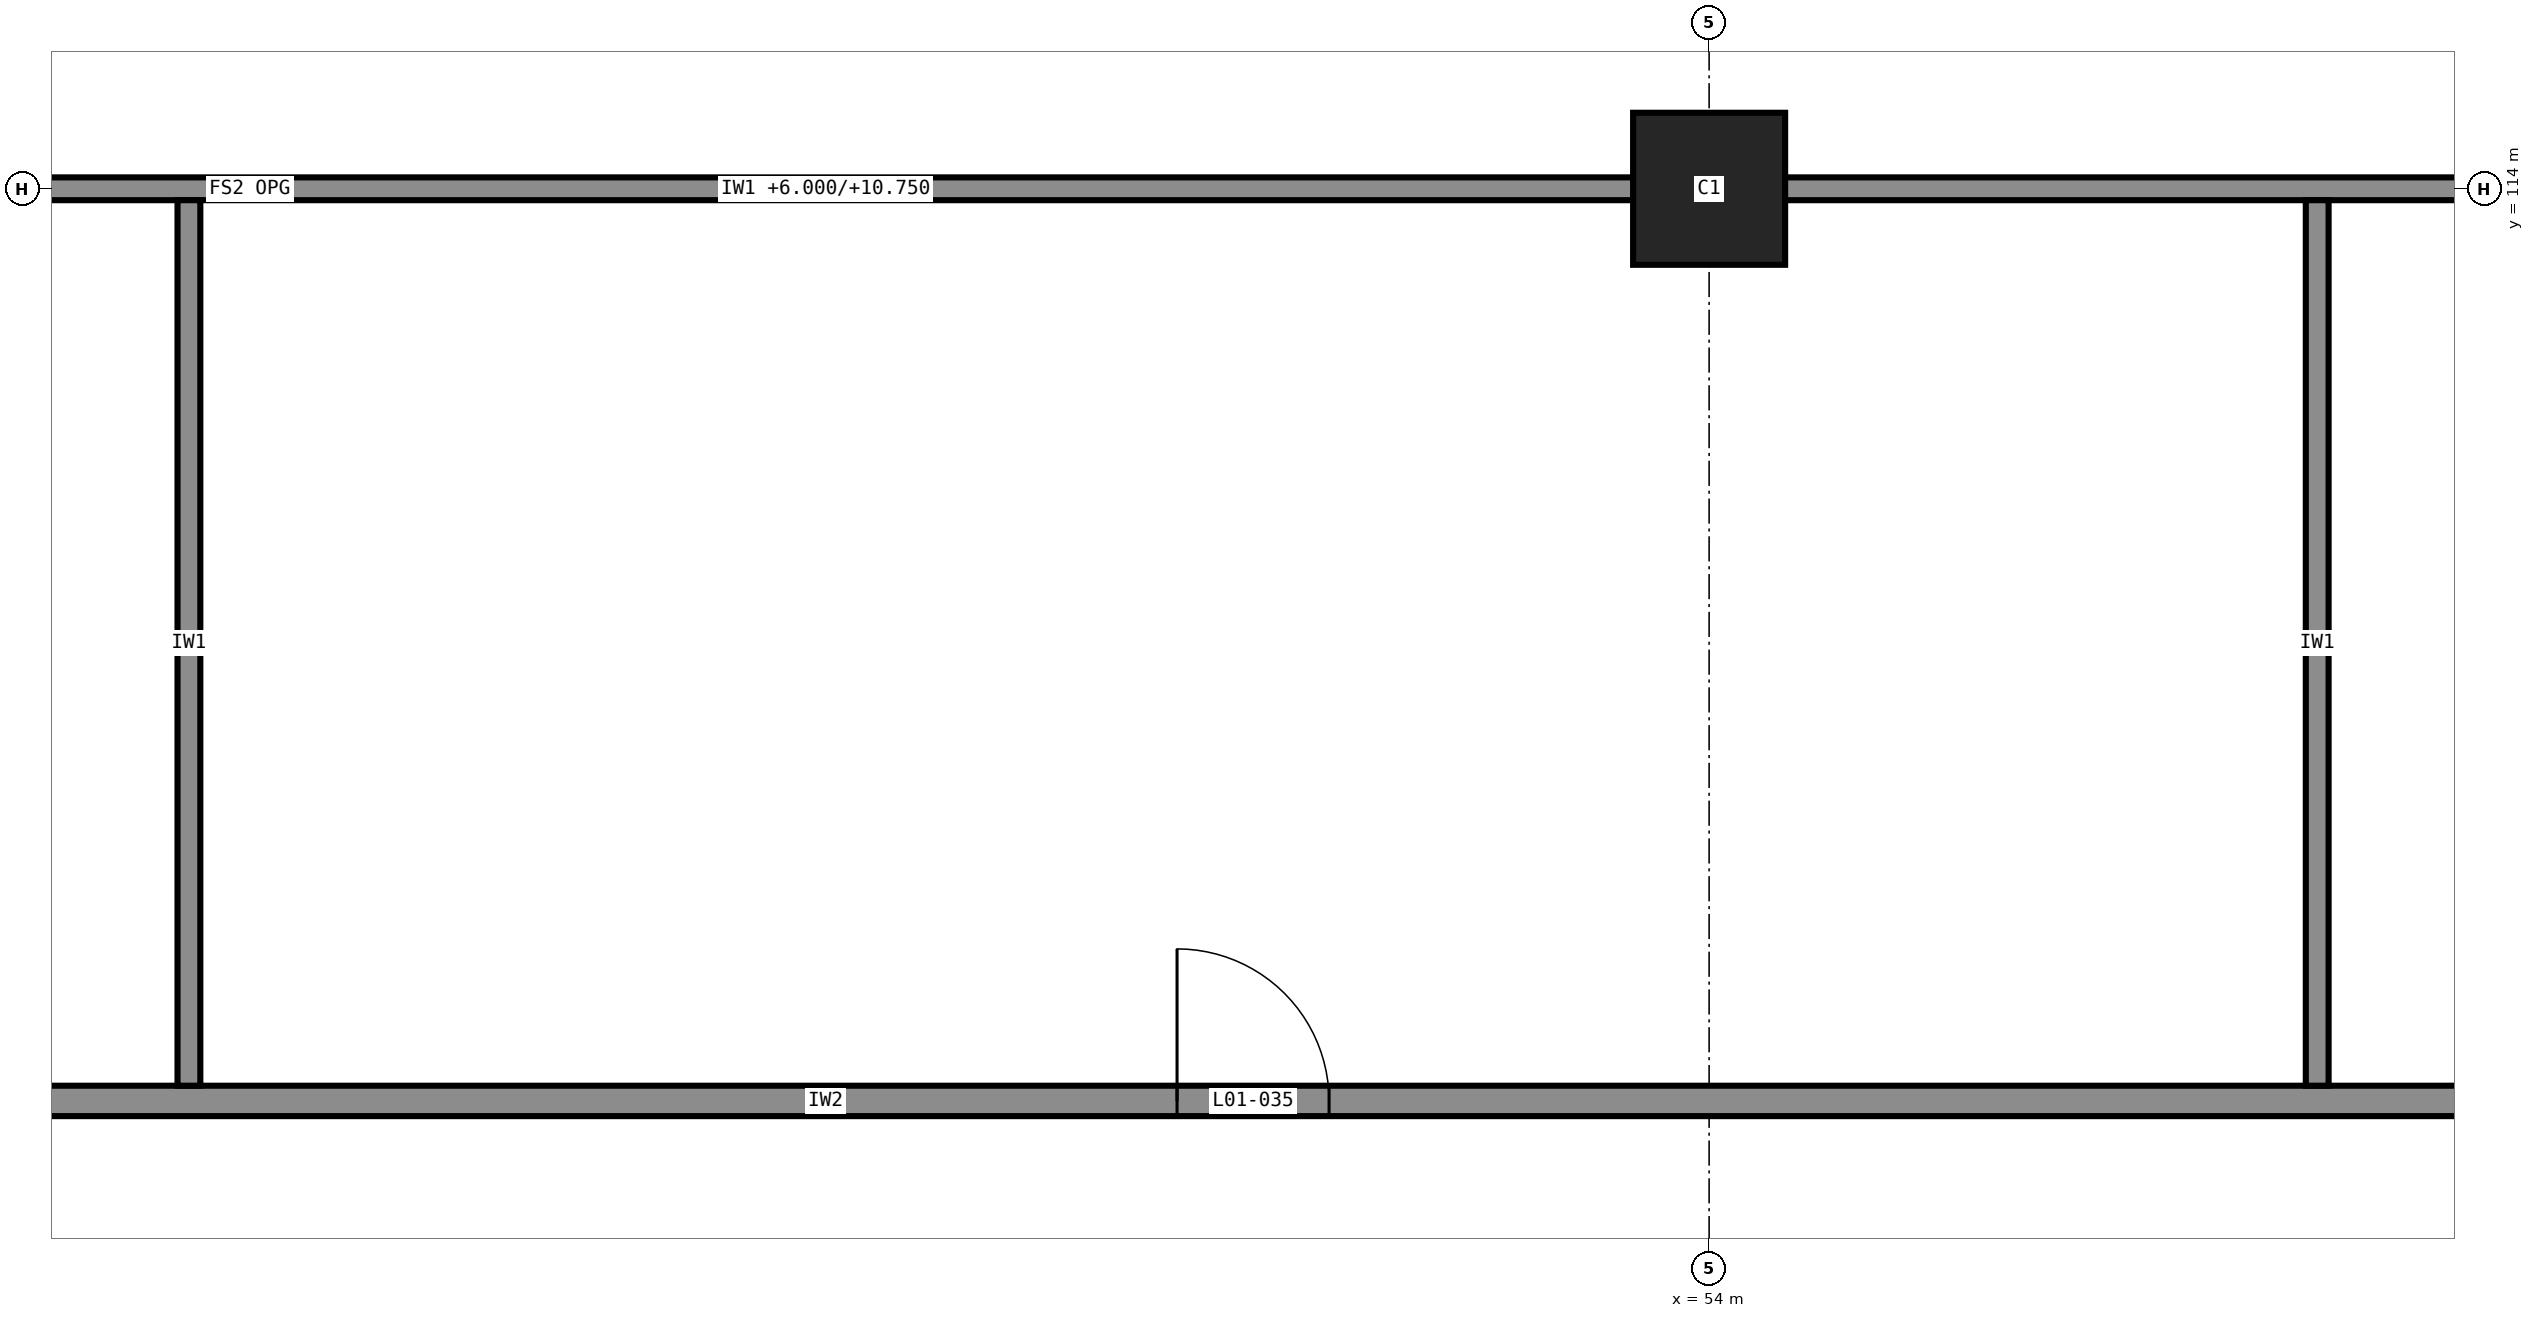
"""IFC4 building model, lengths in metres.
Left out: names, types, materials, properties, quantities, classifications, styles, units other than length and angle.
Written with IfcOpenShell. Run it as: python <this file> out.ifc"""

import sys

from ifc_helpers import new_model, si_unit, direction, frame, frame_2d, origin, origin_2d, place, context, subcontext, project, spatial, rectangle, extrude, element, fill, save


model = new_model("IFC4")
c1 = context("Model", 3, precision=1e-05, world=origin(), true_north=direction((0.0, 1.0)))
c2 = subcontext(c1, "Body", "Model", "MODEL_VIEW")
j1 = project(units=[si_unit("LENGTHUNIT", "METRE"), si_unit("PLANEANGLEUNIT", "RADIAN")], contexts=[c1])
p1 = place(None, origin())
s1 = spatial("IfcSite", under=j1, at=p1, CompositionType="ELEMENT")
p2 = place(p1, origin())
s2 = spatial("IfcBuilding", under=s1, at=p2, CompositionType="ELEMENT")
p3 = place(p2, frame((0.0, 0.0, 6.0)))
s3 = spatial("IfcBuildingStorey", under=s2, at=p3, CompositionType="ELEMENT", Elevation=6.0)
p4 = place(p3, frame((54.0, 114.0, 0.0), z_axis=(0.0, 0.0, 1.0), x_axis=(1.0, 0.0, 0.0)))
e1 = element("IfcColumn", 1, at=p4, inside=s3, PredefinedType="COLUMN", context=c2, shape_type="SweptSolid", body=[
    extrude(rectangle(XDim=1.0, YDim=1.0, at=origin_2d()), origin(), (0.0, 0.0, 1.0), 6.0),
])
p5 = place(p3, frame((30.6, 108.0, 0.0), z_axis=(0.0, 0.0, 1.0), x_axis=(1.0, 0.0, 0.0)))
e2 = element("IfcWall", 2, at=p5, inside=s3, PredefinedType="PARTITIONING", context=c2, shape_type="SweptSolid", body=[
    extrude(rectangle(XDim=41.5, YDim=0.2, at=frame_2d((20.75, 0.0))), origin(), (0.0, 0.0, 1.0), 5.75),
])
p6 = place(p5, frame((5.9, 0.0, 0.0)))
e3 = element("IfcOpeningElement", 3, at=p6, cuts=e2, PredefinedType="OPENING", context=c2, shape_type="SweptSolid", body=[
    extrude(rectangle(XDim=1.0, YDim=2.1, at=frame_2d((0.5, 1.05))), frame((0.0, 0.11, 0.0), z_axis=(0.0, -1.0, 0.0), x_axis=(1.0, 0.0, 0.0)), (0.0, 0.0, 1.0), 0.22),
])
p7 = place(p5, frame((19.9, 0.0, 0.0)))
e4 = element("IfcOpeningElement", 4, at=p7, cuts=e2, PredefinedType="OPENING", context=c2, shape_type="SweptSolid", body=[
    extrude(rectangle(XDim=1.0, YDim=2.1, at=frame_2d((0.5, 1.05))), frame((0.0, 0.11, 0.0), z_axis=(0.0, -1.0, 0.0), x_axis=(1.0, 0.0, 0.0)), (0.0, 0.0, 1.0), 0.22),
])
p8 = place(p5, frame((33.9, 0.0, 0.0)))
e5 = element("IfcOpeningElement", 5, at=p8, cuts=e2, PredefinedType="OPENING", context=c2, shape_type="SweptSolid", body=[
    extrude(rectangle(XDim=1.0, YDim=2.1, at=frame_2d((0.5, 1.05))), frame((0.0, 0.11, 0.0), z_axis=(0.0, -1.0, 0.0), x_axis=(1.0, 0.0, 0.0)), (0.0, 0.0, 1.0), 0.22),
])
p9 = place(p3, frame((29.925, 114.0, 0.0), z_axis=(0.0, 0.0, 1.0), x_axis=(1.0, 0.0, 0.0)))
e6 = element("IfcWall", 6, at=p9, inside=s3, PredefinedType="PARTITIONING", context=c2, shape_type="SweptSolid", body=[
    extrude(rectangle(XDim=42.175, YDim=0.15, at=frame_2d((21.087, 0.0))), origin(), (0.0, 0.0, 1.0), 4.75),
])
for number, where, z_axis, x_axis in (
    (7, (44.0, 108.1, 0.0), (0.0, 0.0, 1.0), (0.0, 1.0, 0.0)),
    (8, (58.0, 108.1, 0.0), (0.0, 0.0, 1.0), (0.0, 1.0, 0.0)),
):
    element("IfcWall", number, at=place(p3, frame(where, z_axis=z_axis, x_axis=x_axis)), inside=s3, PredefinedType="PARTITIONING", context=c2, shape_type="SweptSolid", body=[
        extrude(rectangle(XDim=5.825, YDim=0.15, at=frame_2d((2.913, 0.0))), origin(), (0.0, 0.0, 1.0), 5.75),
    ])
p10 = place(p7, origin())
e9 = element("IfcDoor", 9, at=p10, inside=s3, OperationType="SINGLE_SWING_RIGHT", PredefinedType="DOOR", context=c2, shape_type="SweptSolid", body=[
    extrude(rectangle(XDim=1.0, YDim=2.1, at=frame_2d((0.5, 1.05))), frame((0.0, 0.025, 0.0), z_axis=(0.0, -1.0, 0.0), x_axis=(1.0, 0.0, 0.0)), (0.0, 0.0, 1.0), 0.05),
])
fill(e4, e9)
save(model, sys.argv[1])
